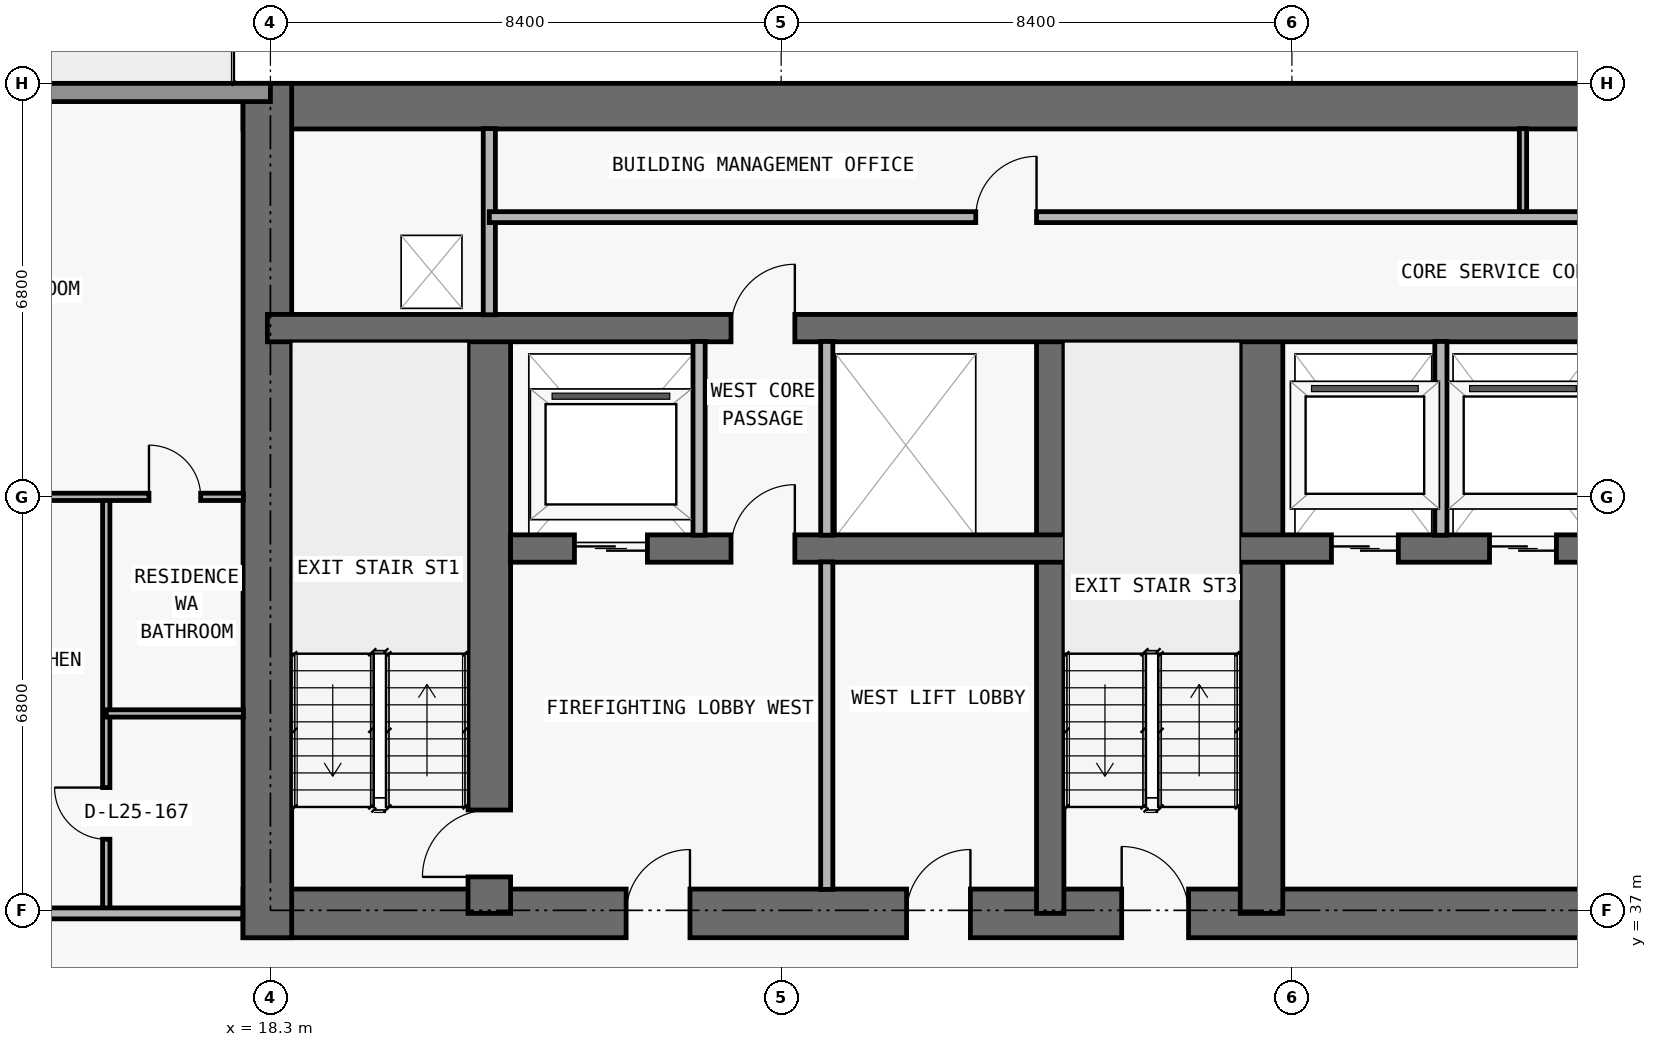
"""IFC4 building model, lengths in metres.
Left out: names, types, materials, properties, quantities, classifications, styles, units other than length and angle.
Written with IfcOpenShell. Run it as: python <this file> out.ifc"""

import sys

from ifc_helpers import new_model, si_unit, direction, frame, frame_2d, origin, place, context, subcontext, project, spatial, rectangle, extrude, element, fill, save


model = new_model("IFC4")
c1 = context("Model", 3, precision=1e-05, world=origin(), true_north=direction((0.0, 1.0)))
c2 = subcontext(c1, "Body", "Model", "MODEL_VIEW")
j1 = project(units=[si_unit("LENGTHUNIT", "METRE"), si_unit("PLANEANGLEUNIT", "RADIAN")], contexts=[c1])
p1 = place(None, origin())
s1 = spatial("IfcSite", under=j1, at=p1, CompositionType="ELEMENT")
p2 = place(p1, origin())
s2 = spatial("IfcBuilding", under=s1, at=p2, CompositionType="ELEMENT")
p3 = place(p2, frame((0.0, 0.0, 94.5)))
s3 = spatial("IfcBuildingStorey", under=s2, at=p3, CompositionType="ELEMENT", Elevation=94.5)
p4 = place(p3, frame((17.85, 36.95, 0.0), z_axis=(0.0, 0.0, 1.0), x_axis=(1.0, 0.0, 0.0)))
e1 = element("IfcWall", 1, at=p4, inside=s3, PredefinedType="SHEAR", context=c2, shape_type="SweptSolid", body=[
    extrude(rectangle(XDim=42.1, YDim=0.8, at=frame_2d((21.05, 0.0))), origin(), (0.0, 0.0, 1.0), 3.0),
])
p5 = place(p4, frame((14.45, 0.0, 0.0)))
e2 = element("IfcOpeningElement", 2, at=p5, cuts=e1, PredefinedType="OPENING", context=c2, shape_type="SweptSolid", body=[
    extrude(rectangle(XDim=1.1, YDim=2.15, at=frame_2d((0.55, 1.075))), frame((0.0, 0.41, 0.0), z_axis=(0.0, -1.0, 0.0), x_axis=(1.0, 0.0, 0.0)), (0.0, 0.0, 1.0), 0.82),
])
p6 = place(p4, frame((6.3, 0.0, 0.0)))
e3 = element("IfcOpeningElement", 3, at=p6, cuts=e1, PredefinedType="OPENING", context=c2, shape_type="SweptSolid", body=[
    extrude(rectangle(XDim=1.05, YDim=2.15, at=frame_2d((0.525, 1.075))), frame((0.0, 0.41, 0.0), z_axis=(0.0, -1.0, 0.0), x_axis=(1.0, 0.0, 0.0)), (0.0, 0.0, 1.0), 0.82),
])
p7 = place(p4, frame((34.8, 0.0, 0.0)))
e4 = element("IfcOpeningElement", 4, at=p7, cuts=e1, PredefinedType="OPENING", context=c2, shape_type="SweptSolid", body=[
    extrude(rectangle(XDim=1.05, YDim=2.15, at=frame_2d((0.525, 1.075))), frame((0.0, 0.41, 0.0), z_axis=(0.0, -1.0, 0.0), x_axis=(1.0, 0.0, 0.0)), (0.0, 0.0, 1.0), 0.82),
])
p8 = place(p4, frame((10.913, 0.0, 0.0)))
e5 = element("IfcOpeningElement", 5, at=p8, cuts=e1, PredefinedType="OPENING", context=c2, shape_type="SweptSolid", body=[
    extrude(rectangle(XDim=1.05, YDim=2.15, at=frame_2d((0.525, 1.075))), frame((0.0, 0.41, 0.0), z_axis=(0.0, -1.0, 0.0), x_axis=(1.0, 0.0, 0.0)), (0.0, 0.0, 1.0), 0.82),
])
p9 = place(p4, frame((24.15, 0.0, 0.0)))
e6 = element("IfcOpeningElement", 6, at=p9, cuts=e1, PredefinedType="OPENING", context=c2, shape_type="SweptSolid", body=[
    extrude(rectangle(XDim=1.05, YDim=2.15, at=frame_2d((0.525, 1.075))), frame((0.0, 0.41, 0.0), z_axis=(0.0, -1.0, 0.0), x_axis=(1.0, 0.0, 0.0)), (0.0, 0.0, 1.0), 0.82),
])
p10 = place(p3, frame((17.85, 50.225, 0.0), z_axis=(0.0, 0.0, 1.0), x_axis=(1.0, 0.0, 0.0)))
e7 = element("IfcWall", 7, at=p10, inside=s3, PredefinedType="SHEAR", context=c2, shape_type="SweptSolid", body=[
    extrude(rectangle(XDim=42.1, YDim=0.75, at=frame_2d((21.05, 0.0))), origin(), (0.0, 0.0, 1.0), 3.0),
])
p11 = place(p3, frame((18.25, 36.55, 0.0), z_axis=(0.0, 0.0, 1.0), x_axis=(0.0, 1.0, 0.0)))
e8 = element("IfcWall", 8, at=p11, inside=s3, PredefinedType="SHEAR", context=c2, shape_type="SweptSolid", body=[
    extrude(rectangle(XDim=14.05, YDim=0.8, at=frame_2d((7.025, 0.0))), origin(), (0.0, 0.0, 1.0), 3.0),
])
p12 = place(p3, frame((21.9, 36.95, 0.0), z_axis=(0.0, 0.0, 1.0), x_axis=(0.0, 1.0, 0.0)))
e9 = element("IfcWall", 9, at=p12, inside=s3, PredefinedType="SHEAR", context=c2, shape_type="SweptSolid", body=[
    extrude(rectangle(XDim=9.625, YDim=0.7, at=frame_2d((4.812, 0.0))), origin(), (0.0, 0.0, 1.0), 3.0),
])
p13 = place(p12, frame((0.6, 0.0, 0.0)))
e10 = element("IfcOpeningElement", 10, at=p13, cuts=e9, PredefinedType="OPENING", context=c2, shape_type="SweptSolid", body=[
    extrude(rectangle(XDim=1.1, YDim=2.15, at=frame_2d((0.55, 1.075))), frame((0.0, 0.36, 0.0), z_axis=(0.0, -1.0, 0.0), x_axis=(1.0, 0.0, 0.0)), (0.0, 0.0, 1.0), 0.72),
])
p14 = place(p3, frame((31.125, 36.95, 0.0), z_axis=(0.0, 0.0, 1.0), x_axis=(0.0, 1.0, 0.0)))
e11 = element("IfcWall", 11, at=p14, inside=s3, PredefinedType="SHEAR", context=c2, shape_type="SweptSolid", body=[
    extrude(rectangle(XDim=9.625, YDim=0.45, at=frame_2d((4.812, 0.0))), origin(), (0.0, 0.0, 1.0), 3.0),
])
p15 = place(p3, frame((34.6, 36.95, 0.0), z_axis=(0.0, 0.0, 1.0), x_axis=(0.0, 1.0, 0.0)))
e12 = element("IfcWall", 12, at=p15, inside=s3, PredefinedType="SHEAR", context=c2, shape_type="SweptSolid", body=[
    extrude(rectangle(XDim=9.625, YDim=0.7, at=frame_2d((4.812, 0.0))), origin(), (0.0, 0.0, 1.0), 3.0),
])
p16 = place(p3, frame((22.25, 42.95, 0.0), z_axis=(0.0, 0.0, 1.0), x_axis=(1.0, 0.0, 0.0)))
e13 = element("IfcWall", 13, at=p16, inside=s3, PredefinedType="SHEAR", context=c2, shape_type="SweptSolid", body=[
    extrude(rectangle(XDim=33.3, YDim=0.45, at=frame_2d((16.65, 0.0))), origin(), (0.0, 0.0, 1.0), 3.0),
])
p17 = place(p16, frame((1.05, 0.0, 0.0)))
e14 = element("IfcOpeningElement", 14, at=p17, cuts=e13, PredefinedType="OPENING", context=c2, shape_type="SweptSolid", body=[
    extrude(rectangle(XDim=1.2, YDim=2.2, at=frame_2d((0.6, 1.1))), frame((0.0, 0.235, 0.0), z_axis=(0.0, -1.0, 0.0), x_axis=(1.0, 0.0, 0.0)), (0.0, 0.0, 1.0), 0.47),
])
p18 = place(p16, frame((31.05, 0.0, 0.0)))
e15 = element("IfcOpeningElement", 15, at=p18, cuts=e13, PredefinedType="OPENING", context=c2, shape_type="SweptSolid", body=[
    extrude(rectangle(XDim=1.2, YDim=2.2, at=frame_2d((0.6, 1.1))), frame((0.0, 0.235, 0.0), z_axis=(0.0, -1.0, 0.0), x_axis=(1.0, 0.0, 0.0)), (0.0, 0.0, 1.0), 0.47),
])
p19 = place(p16, frame((13.5, 0.0, 0.0)))
e16 = element("IfcOpeningElement", 16, at=p19, cuts=e13, PredefinedType="OPENING", context=c2, shape_type="SweptSolid", body=[
    extrude(rectangle(XDim=1.1, YDim=2.2, at=frame_2d((0.55, 1.1))), frame((0.0, 0.235, 0.0), z_axis=(0.0, -1.0, 0.0), x_axis=(1.0, 0.0, 0.0)), (0.0, 0.0, 1.0), 0.47),
])
p20 = place(p16, frame((16.1, 0.0, 0.0)))
e17 = element("IfcOpeningElement", 17, at=p20, cuts=e13, PredefinedType="OPENING", context=c2, shape_type="SweptSolid", body=[
    extrude(rectangle(XDim=1.1, YDim=2.2, at=frame_2d((0.55, 1.1))), frame((0.0, 0.235, 0.0), z_axis=(0.0, -1.0, 0.0), x_axis=(1.0, 0.0, 0.0)), (0.0, 0.0, 1.0), 0.47),
])
p21 = place(p16, frame((18.7, 0.0, 0.0)))
e18 = element("IfcOpeningElement", 18, at=p21, cuts=e13, PredefinedType="OPENING", context=c2, shape_type="SweptSolid", body=[
    extrude(rectangle(XDim=1.1, YDim=2.2, at=frame_2d((0.55, 1.1))), frame((0.0, 0.235, 0.0), z_axis=(0.0, -1.0, 0.0), x_axis=(1.0, 0.0, 0.0)), (0.0, 0.0, 1.0), 0.47),
])
p22 = place(p16, frame((3.625, 0.0, 0.0)))
e19 = element("IfcOpeningElement", 19, at=p22, cuts=e13, PredefinedType="OPENING", context=c2, shape_type="SweptSolid", body=[
    extrude(rectangle(XDim=1.05, YDim=2.15, at=frame_2d((0.525, 1.075))), frame((0.0, 0.235, 0.0), z_axis=(0.0, -1.0, 0.0), x_axis=(1.0, 0.0, 0.0)), (0.0, 0.0, 1.0), 0.47),
])
p23 = place(p16, frame((28.675, 0.0, 0.0)))
e20 = element("IfcOpeningElement", 20, at=p23, cuts=e13, PredefinedType="OPENING", context=c2, shape_type="SweptSolid", body=[
    extrude(rectangle(XDim=1.05, YDim=2.15, at=frame_2d((0.525, 1.075))), frame((0.0, 0.235, 0.0), z_axis=(0.0, -1.0, 0.0), x_axis=(1.0, 0.0, 0.0)), (0.0, 0.0, 1.0), 0.47),
])
p24 = place(p3, frame((18.25, 46.575, 0.0), z_axis=(0.0, 0.0, 1.0), x_axis=(1.0, 0.0, 0.0)))
e21 = element("IfcWall", 21, at=p24, inside=s3, PredefinedType="SHEAR", context=c2, shape_type="SweptSolid", body=[
    extrude(rectangle(XDim=41.3, YDim=0.45, at=frame_2d((20.65, 0.0))), origin(), (0.0, 0.0, 1.0), 3.0),
])
p25 = place(p24, frame((7.625, 0.0, 0.0)))
e22 = element("IfcOpeningElement", 22, at=p25, cuts=e21, PredefinedType="OPENING", context=c2, shape_type="SweptSolid", body=[
    extrude(rectangle(XDim=1.05, YDim=2.15, at=frame_2d((0.525, 1.075))), frame((0.0, 0.235, 0.0), z_axis=(0.0, -1.0, 0.0), x_axis=(1.0, 0.0, 0.0)), (0.0, 0.0, 1.0), 0.47),
])
p26 = place(p24, frame((32.675, 0.0, 0.0)))
e23 = element("IfcOpeningElement", 23, at=p26, cuts=e21, PredefinedType="OPENING", context=c2, shape_type="SweptSolid", body=[
    extrude(rectangle(XDim=1.05, YDim=2.15, at=frame_2d((0.525, 1.075))), frame((0.0, 0.235, 0.0), z_axis=(0.0, -1.0, 0.0), x_axis=(1.0, 0.0, 0.0)), (0.0, 0.0, 1.0), 0.47),
])
p27 = place(p3, frame((7.7, 50.45, 0.0), z_axis=(0.0, 0.0, 1.0), x_axis=(1.0, 0.0, 0.0)))
e24 = element("IfcWall", 24, at=p27, inside=s3, PredefinedType="STANDARD", context=c2, shape_type="SweptSolid", body=[
    extrude(rectangle(XDim=10.6, YDim=0.3, at=frame_2d((5.3, 0.0))), origin(), (0.0, 0.0, 1.0), 3.0),
])
p28 = place(p27, frame((4.3, 0.0, 0.0)))
e25 = element("IfcOpeningElement", 25, at=p28, cuts=e24, PredefinedType="OPENING", context=c2, shape_type="SweptSolid", body=[
    extrude(rectangle(XDim=2.0, YDim=2.3, at=frame_2d((1.0, 1.15))), frame((0.0, 0.16, 0.0), z_axis=(0.0, -1.0, 0.0), x_axis=(1.0, 0.0, 0.0)), (0.0, 0.0, 1.0), 0.32),
])
p29 = place(p3, frame((15.6, 36.95, 0.0), z_axis=(0.0, 0.0, 1.0), x_axis=(0.0, 1.0, 0.0)))
e26 = element("IfcWall", 26, at=p29, inside=s3, PredefinedType="PARTITIONING", context=c2, shape_type="SweptSolid", body=[
    extrude(rectangle(XDim=6.85, YDim=0.12, at=frame_2d((3.425, 0.0))), origin(), (0.0, 0.0, 1.0), 3.0),
])
p30 = place(p29, frame((1.219, 0.0, 0.0)))
e27 = element("IfcOpeningElement", 27, at=p30, cuts=e26, PredefinedType="OPENING", context=c2, shape_type="SweptSolid", body=[
    extrude(rectangle(XDim=0.85, YDim=2.1, at=frame_2d((0.425, 1.05))), frame((0.0, 0.07, 0.0), z_axis=(0.0, -1.0, 0.0), x_axis=(1.0, 0.0, 0.0)), (0.0, 0.0, 1.0), 0.14),
])
p31 = place(p3, frame((21.9, 46.795, 0.0), z_axis=(0.0, 0.0, 1.0), x_axis=(0.0, 1.0, 0.0)))
e28 = element("IfcWall", 28, at=p31, inside=s3, PredefinedType="PARTITIONING", context=c2, shape_type="SweptSolid", body=[
    extrude(rectangle(XDim=3.06, YDim=0.2, at=frame_2d((1.53, 0.0))), origin(), (0.0, 0.0, 1.0), 3.0),
])
p32 = place(p3, frame((25.35, 43.17, 0.0), z_axis=(0.0, 0.0, 1.0), x_axis=(0.0, 1.0, 0.0)))
e29 = element("IfcWall", 29, at=p32, inside=s3, PredefinedType="PARTITIONING", context=c2, shape_type="SweptSolid", body=[
    extrude(rectangle(XDim=3.185, YDim=0.2, at=frame_2d((1.593, 0.0))), origin(), (0.0, 0.0, 1.0), 3.0),
])
p33 = place(p3, frame((27.45, 37.345, 0.0), z_axis=(0.0, 0.0, 1.0), x_axis=(0.0, 1.0, 0.0)))
e30 = element("IfcWall", 30, at=p33, inside=s3, PredefinedType="PARTITIONING", context=c2, shape_type="SweptSolid", body=[
    extrude(rectangle(XDim=5.385, YDim=0.2, at=frame_2d((2.692, 0.0))), origin(), (0.0, 0.0, 1.0), 3.0),
])
for number, where, z_axis, x_axis in (
    (31, (27.45, 43.17, 0.0), (0.0, 0.0, 1.0), (0.0, 1.0, 0.0)),
    (32, (37.55, 43.17, 0.0), (0.0, 0.0, 1.0), (0.0, 1.0, 0.0)),
):
    element("IfcWall", number, at=place(p3, frame(where, z_axis=z_axis, x_axis=x_axis)), inside=s3, PredefinedType="PARTITIONING", context=c2, shape_type="SweptSolid", body=[
        extrude(rectangle(XDim=3.185, YDim=0.2, at=frame_2d((1.593, 0.0))), origin(), (0.0, 0.0, 1.0), 3.0),
    ])
p34 = place(p3, frame((38.9, 48.4, 0.0), z_axis=(0.0, 0.0, 1.0), x_axis=(0.0, 1.0, 0.0)))
e33 = element("IfcWall", 33, at=p34, inside=s3, PredefinedType="PARTITIONING", context=c2, shape_type="SweptSolid", body=[
    extrude(rectangle(XDim=1.455, YDim=0.12, at=frame_2d((0.728, 0.0))), origin(), (0.0, 0.0, 1.0), 3.0),
])
p35 = place(p3, frame((7.7, 36.95, 0.0), z_axis=(0.0, 0.0, 1.0), x_axis=(1.0, 0.0, 0.0)))
e34 = element("IfcWall", 34, at=p35, inside=s3, PredefinedType="PARTITIONING", context=c2, shape_type="SweptSolid", body=[
    extrude(rectangle(XDim=10.145, YDim=0.18, at=frame_2d((5.073, 0.0))), origin(), (0.0, 0.0, 1.0), 3.0),
])
p36 = place(p35, frame((5.188, 0.0, 0.0)))
e35 = element("IfcOpeningElement", 35, at=p36, cuts=e34, PredefinedType="OPENING", context=c2, shape_type="SweptSolid", body=[
    extrude(rectangle(XDim=1.0, YDim=2.2, at=frame_2d((0.5, 1.1))), frame((0.0, 0.1, 0.0), z_axis=(0.0, -1.0, 0.0), x_axis=(1.0, 0.0, 0.0)), (0.0, 0.0, 1.0), 0.2),
])
p37 = place(p3, frame((15.6, 40.238, 0.0), z_axis=(0.0, 0.0, 1.0), x_axis=(1.0, 0.0, 0.0)))
e36 = element("IfcWall", 36, at=p37, inside=s3, PredefinedType="PARTITIONING", context=c2, shape_type="SweptSolid", body=[
    extrude(rectangle(XDim=2.255, YDim=0.12, at=frame_2d((1.127, 0.0))), origin(), (0.0, 0.0, 1.0), 3.0),
])
p38 = place(p3, frame((4.195, 43.8, 0.0), z_axis=(0.0, 0.0, 1.0), x_axis=(1.0, 0.0, 0.0)))
e37 = element("IfcWall", 37, at=p38, inside=s3, PredefinedType="PARTITIONING", context=c2, shape_type="SweptSolid", body=[
    extrude(rectangle(XDim=13.66, YDim=0.12, at=frame_2d((6.83, 0.0))), origin(), (0.0, 0.0, 1.0), 2.289),
])
p39 = place(p38, frame((8.743, 0.0, 0.0)))
e38 = element("IfcOpeningElement", 38, at=p39, cuts=e37, PredefinedType="OPENING", context=c2, shape_type="SweptSolid", body=[
    extrude(rectangle(XDim=0.9, YDim=2.15, at=frame_2d((0.45, 1.075))), frame((0.0, 0.07, 0.0), z_axis=(0.0, -1.0, 0.0), x_axis=(1.0, 0.0, 0.0)), (0.0, 0.0, 1.0), 0.14),
])
p40 = place(p38, frame((12.107, 0.0, 0.0)))
e39 = element("IfcOpeningElement", 39, at=p40, cuts=e37, PredefinedType="OPENING", context=c2, shape_type="SweptSolid", body=[
    extrude(rectangle(XDim=0.85, YDim=2.1, at=frame_2d((0.425, 1.05))), frame((0.0, 0.07, 0.0), z_axis=(0.0, -1.0, 0.0), x_axis=(1.0, 0.0, 0.0)), (0.0, 0.0, 1.0), 0.14),
])
p41 = place(p3, frame((21.9, 48.4, 0.0), z_axis=(0.0, 0.0, 1.0), x_axis=(1.0, 0.0, 0.0)))
e40 = element("IfcWall", 40, at=p41, inside=s3, PredefinedType="PARTITIONING", context=c2, shape_type="SweptSolid", body=[
    extrude(rectangle(XDim=34.0, YDim=0.18, at=frame_2d((17.0, 0.0))), origin(), (0.0, 0.0, 1.0), 3.0),
])
p42 = place(p41, frame((8.0, 0.0, 0.0)))
e41 = element("IfcOpeningElement", 41, at=p42, cuts=e40, PredefinedType="OPENING", context=c2, shape_type="SweptSolid", body=[
    extrude(rectangle(XDim=1.0, YDim=2.2, at=frame_2d((0.5, 1.1))), frame((0.0, 0.1, 0.0), z_axis=(0.0, -1.0, 0.0), x_axis=(1.0, 0.0, 0.0)), (0.0, 0.0, 1.0), 0.2),
])
p43 = place(p41, frame((25.0, 0.0, 0.0)))
e42 = element("IfcOpeningElement", 42, at=p43, cuts=e40, PredefinedType="OPENING", context=c2, shape_type="SweptSolid", body=[
    extrude(rectangle(XDim=1.0, YDim=2.2, at=frame_2d((0.5, 1.1))), frame((0.0, 0.1, 0.0), z_axis=(0.0, -1.0, 0.0), x_axis=(1.0, 0.0, 0.0)), (0.0, 0.0, 1.0), 0.2),
])
p44 = place(p17, origin())
e43 = element("IfcDoor", 43, at=p44, inside=s3, OperationType="DOUBLE_DOOR_SLIDING", PredefinedType="DOOR", context=c2, shape_type="SweptSolid", body=[
    extrude(rectangle(XDim=1.2, YDim=2.2, at=frame_2d((0.6, 1.1))), frame((0.0, 0.025, 0.0), z_axis=(0.0, -1.0, 0.0), x_axis=(1.0, 0.0, 0.0)), (0.0, 0.0, 1.0), 0.05),
])
fill(e14, e43)
p45 = place(p19, origin())
e44 = element("IfcDoor", 44, at=p45, inside=s3, OperationType="DOUBLE_DOOR_SLIDING", PredefinedType="DOOR", context=c2, shape_type="SweptSolid", body=[
    extrude(rectangle(XDim=1.1, YDim=2.2, at=frame_2d((0.55, 1.1))), frame((0.0, 0.025, 0.0), z_axis=(0.0, -1.0, 0.0), x_axis=(1.0, 0.0, 0.0)), (0.0, 0.0, 1.0), 0.05),
])
fill(e16, e44)
p46 = place(p20, origin())
e45 = element("IfcDoor", 45, at=p46, inside=s3, OperationType="DOUBLE_DOOR_SLIDING", PredefinedType="DOOR", context=c2, shape_type="SweptSolid", body=[
    extrude(rectangle(XDim=1.1, YDim=2.2, at=frame_2d((0.55, 1.1))), frame((0.0, 0.025, 0.0), z_axis=(0.0, -1.0, 0.0), x_axis=(1.0, 0.0, 0.0)), (0.0, 0.0, 1.0), 0.05),
])
fill(e17, e45)
p47 = place(p5, origin())
e46 = element("IfcDoor", 46, at=p47, inside=s3, OperationType="SINGLE_SWING_LEFT", PredefinedType="DOOR", context=c2, shape_type="SweptSolid", body=[
    extrude(rectangle(XDim=1.1, YDim=2.15, at=frame_2d((0.55, 1.075))), frame((0.0, 0.025, 0.0), z_axis=(0.0, -1.0, 0.0), x_axis=(1.0, 0.0, 0.0)), (0.0, 0.0, 1.0), 0.05),
])
fill(e2, e46)
p48 = place(p6, origin())
e47 = element("IfcDoor", 47, at=p48, inside=s3, OperationType="SINGLE_SWING_RIGHT", PredefinedType="DOOR", context=c2, shape_type="SweptSolid", body=[
    extrude(rectangle(XDim=1.05, YDim=2.15, at=frame_2d((0.525, 1.075))), frame((0.0, 0.025, 0.0), z_axis=(0.0, -1.0, 0.0), x_axis=(1.0, 0.0, 0.0)), (0.0, 0.0, 1.0), 0.05),
])
fill(e3, e47)
p49 = place(p13, origin())
e48 = element("IfcDoor", 48, at=p49, inside=s3, OperationType="SINGLE_SWING_LEFT", PredefinedType="DOOR", context=c2, shape_type="SweptSolid", body=[
    extrude(rectangle(XDim=1.1, YDim=2.15, at=frame_2d((0.55, 1.075))), frame((0.0, 0.025, 0.0), z_axis=(0.0, -1.0, 0.0), x_axis=(1.0, 0.0, 0.0)), (0.0, 0.0, 1.0), 0.05),
])
fill(e10, e48)
p50 = place(p22, origin())
e49 = element("IfcDoor", 49, at=p50, inside=s3, OperationType="SINGLE_SWING_RIGHT", PredefinedType="DOOR", context=c2, shape_type="SweptSolid", body=[
    extrude(rectangle(XDim=1.05, YDim=2.15, at=frame_2d((0.525, 1.075))), frame((0.0, 0.025, 0.0), z_axis=(0.0, -1.0, 0.0), x_axis=(1.0, 0.0, 0.0)), (0.0, 0.0, 1.0), 0.05),
])
fill(e19, e49)
p51 = place(p8, origin())
e50 = element("IfcDoor", 50, at=p51, inside=s3, OperationType="SINGLE_SWING_RIGHT", PredefinedType="DOOR", context=c2, shape_type="SweptSolid", body=[
    extrude(rectangle(XDim=1.05, YDim=2.15, at=frame_2d((0.525, 1.075))), frame((0.0, 0.025, 0.0), z_axis=(0.0, -1.0, 0.0), x_axis=(1.0, 0.0, 0.0)), (0.0, 0.0, 1.0), 0.05),
])
fill(e5, e50)
p52 = place(p25, origin())
e51 = element("IfcDoor", 51, at=p52, inside=s3, OperationType="SINGLE_SWING_RIGHT", PredefinedType="DOOR", context=c2, shape_type="SweptSolid", body=[
    extrude(rectangle(XDim=1.05, YDim=2.15, at=frame_2d((0.525, 1.075))), frame((0.0, 0.025, 0.0), z_axis=(0.0, -1.0, 0.0), x_axis=(1.0, 0.0, 0.0)), (0.0, 0.0, 1.0), 0.05),
])
fill(e22, e51)
p53 = place(p42, origin())
e52 = element("IfcDoor", 52, at=p53, inside=s3, OperationType="SINGLE_SWING_RIGHT", PredefinedType="DOOR", context=c2, shape_type="SweptSolid", body=[
    extrude(rectangle(XDim=1.0, YDim=2.2, at=frame_2d((0.5, 1.1))), frame((0.0, 0.025, 0.0), z_axis=(0.0, -1.0, 0.0), x_axis=(1.0, 0.0, 0.0)), (0.0, 0.0, 1.0), 0.05),
])
fill(e41, e52)
p54 = place(p30, origin())
e53 = element("IfcDoor", 53, at=p54, inside=s3, OperationType="SINGLE_SWING_RIGHT", PredefinedType="DOOR", context=c2, shape_type="SweptSolid", body=[
    extrude(rectangle(XDim=0.85, YDim=2.1, at=frame_2d((0.425, 1.05))), frame((0.0, 0.025, 0.0), z_axis=(0.0, -1.0, 0.0), x_axis=(1.0, 0.0, 0.0)), (0.0, 0.0, 1.0), 0.05),
])
fill(e27, e53)
p55 = place(p40, origin())
e54 = element("IfcDoor", 54, at=p55, inside=s3, OperationType="SINGLE_SWING_LEFT", PredefinedType="DOOR", context=c2, shape_type="SweptSolid", body=[
    extrude(rectangle(XDim=0.85, YDim=2.1, at=frame_2d((0.425, 1.05))), frame((0.0, 0.025, 0.0), z_axis=(0.0, -1.0, 0.0), x_axis=(1.0, 0.0, 0.0)), (0.0, 0.0, 1.0), 0.05),
])
fill(e39, e54)
save(model, sys.argv[1])
